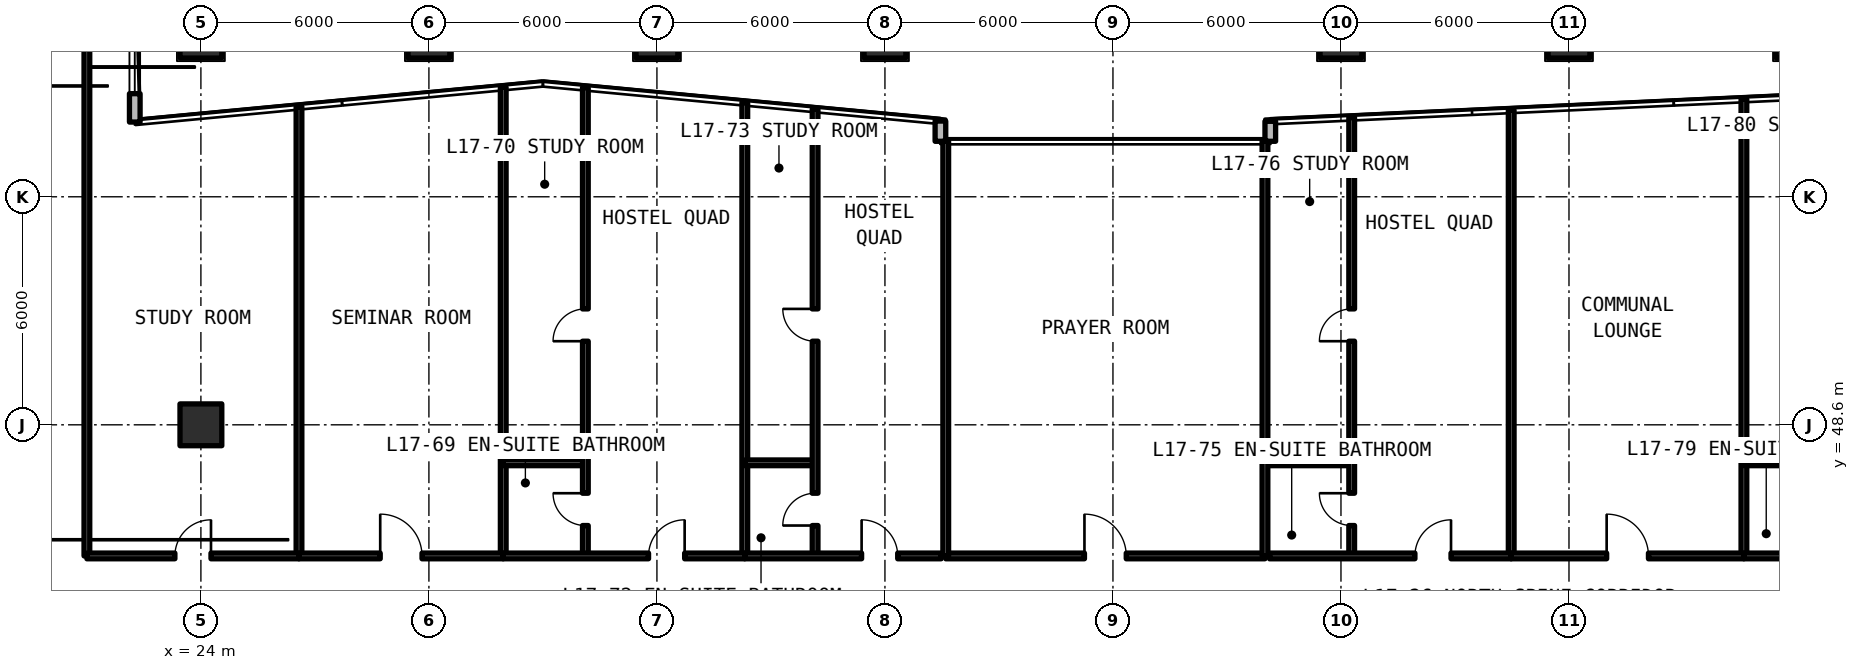
"""IFC4 building model, lengths in metres.
Left out: names, types, materials, properties, quantities, classifications, styles, units other than length and angle.
Written with IfcOpenShell. Run it as: python <this file> out.ifc"""

import sys

from ifc_helpers import new_model, si_unit, direction, frame, frame_2d, origin, origin_2d, place, context, subcontext, project, spatial, rectangle, extrude, element, fill, save


model = new_model("IFC4")
c1 = context("Model", 3, precision=1e-05, world=origin(), true_north=direction((0.0, 1.0)))
c2 = subcontext(c1, "Body", "Model", "MODEL_VIEW")
j1 = project(units=[si_unit("LENGTHUNIT", "METRE"), si_unit("PLANEANGLEUNIT", "RADIAN")], contexts=[c1])
p1 = place(None, origin())
s1 = spatial("IfcSite", under=j1, at=p1, CompositionType="ELEMENT")
p2 = place(p1, origin())
s2 = spatial("IfcBuilding", under=s1, at=p2, CompositionType="ELEMENT")
p3 = place(p2, frame((0.0, 0.0, 62.37)))
s3 = spatial("IfcBuildingStorey", under=s2, at=p3, CompositionType="ELEMENT", Elevation=62.37)
for number, where, z_axis, x_axis in (
    (1, (24.0, 48.6, 0.0), (0.0, 0.0, 1.0), (1.0, 0.0, 0.0)),
    (2, (24.0, 58.8, 0.0), (0.0, 0.0, 1.0), (1.0, 0.0, 0.0)),
    (3, (30.0, 58.8, 0.0), (0.0, 0.0, 1.0), (1.0, 0.0, 0.0)),
    (4, (36.0, 58.8, 0.0), (0.0, 0.0, 1.0), (1.0, 0.0, 0.0)),
    (5, (42.0, 58.8, 0.0), (0.0, 0.0, 1.0), (1.0, 0.0, 0.0)),
    (6, (54.0, 58.8, 0.0), (0.0, 0.0, 1.0), (1.0, 0.0, 0.0)),
    (7, (60.0, 58.8, 0.0), (0.0, 0.0, 1.0), (1.0, 0.0, 0.0)),
    (8, (66.0, 58.8, 0.0), (0.0, 0.0, 1.0), (1.0, 0.0, 0.0)),
):
    element("IfcColumn", number, at=place(p3, frame(where, z_axis=z_axis, x_axis=x_axis)), inside=s3, PredefinedType="COLUMN", context=c2, shape_type="SweptSolid", body=[
        extrude(rectangle(XDim=1.1, YDim=1.1, at=origin_2d()), origin(), (0.0, 0.0, 1.0), 3.63),
    ])
p4 = place(p3, frame((52.14, 56.586, 0.0), z_axis=(0.0, 0.0, 1.0), x_axis=(0.0, -1.0, 0.0)))
e9 = element("IfcWall", 9, at=p4, inside=s3, PredefinedType="SOLIDWALL", context=c2, shape_type="SweptSolid", body=[
    extrude(rectangle(XDim=0.526, YDim=0.28, at=frame_2d((0.263, 0.0))), origin(), (0.0, 0.0, 1.0), 3.41),
])
p5 = place(p3, frame((43.46, 56.06, 0.0), z_axis=(0.0, 0.0, 1.0), x_axis=(0.0, 1.0, 0.0)))
e10 = element("IfcWall", 10, at=p5, inside=s3, PredefinedType="SOLIDWALL", context=c2, shape_type="SweptSolid", body=[
    extrude(rectangle(XDim=0.532, YDim=0.28, at=frame_2d((0.266, 0.0))), origin(), (0.0, 0.0, 1.0), 3.41),
])
p6 = place(p3, frame((22.26, 56.566, 0.0), z_axis=(0.0, 0.0, 1.0), x_axis=(0.0, 1.0, 0.0)))
e11 = element("IfcWall", 11, at=p6, inside=s3, PredefinedType="SOLIDWALL", context=c2, shape_type="SweptSolid", body=[
    extrude(rectangle(XDim=2.894, YDim=0.28, at=frame_2d((1.447, 0.0))), origin(), (0.0, 0.0, 1.0), 3.41),
])
p7 = place(p6, frame((0.747, 0.0, 0.78)))
e12 = element("IfcOpeningElement", 12, at=p7, cuts=e11, PredefinedType="OPENING", context=c2, shape_type="SweptSolid", body=[
    extrude(rectangle(XDim=1.4, YDim=1.65, at=frame_2d((0.7, 0.825))), frame((0.0, 0.15, 0.0), z_axis=(0.0, -1.0, 0.0), x_axis=(1.0, 0.0, 0.0)), (0.0, 0.0, 1.0), 0.3),
])
p8 = place(p3, frame((20.858, 59.46, 0.0), z_axis=(0.0, 0.0, 1.0), x_axis=(-0.707106781187, -0.707106781187, 0.0)))
e13 = element("IfcWall", 13, at=p8, inside=s3, PredefinedType="SOLIDWALL", context=c2, shape_type="SweptSolid", body=[
    extrude(rectangle(XDim=5.824, YDim=0.28, at=frame_2d((2.912, 0.0))), origin(), (0.0, 0.0, 1.0), 3.41),
])
p9 = place(p8, frame((1.212, 0.0, 0.78)))
e14 = element("IfcOpeningElement", 14, at=p9, cuts=e13, PredefinedType="OPENING", context=c2, shape_type="SweptSolid", body=[
    extrude(rectangle(XDim=3.4, YDim=1.66, at=frame_2d((1.7, 0.83))), frame((0.0, 0.15, 0.0), z_axis=(0.0, -1.0, 0.0), x_axis=(1.0, 0.0, 0.0)), (0.0, 0.0, 1.0), 0.3),
])
p10 = place(p3, frame((43.6, 45.15, 0.0), z_axis=(0.0, 0.0, 1.0), x_axis=(1.0, 0.0, 0.0)))
e15 = element("IfcWall", 15, at=p10, inside=s3, PredefinedType="SOLIDWALL", context=c2, shape_type="SweptSolid", body=[
    extrude(rectangle(XDim=8.4, YDim=0.15, at=frame_2d((4.2, 0.0))), origin(), (0.0, 0.0, 1.0), 2.63),
])
p11 = place(p10, frame((3.65, 0.0, 0.0)))
e16 = element("IfcOpeningElement", 16, at=p11, cuts=e15, PredefinedType="OPENING", context=c2, shape_type="SweptSolid", body=[
    extrude(rectangle(XDim=1.1, YDim=2.15, at=frame_2d((0.55, 1.075))), frame((0.0, 0.085, 0.0), z_axis=(0.0, -1.0, 0.0), x_axis=(1.0, 0.0, 0.0)), (0.0, 0.0, 1.0), 0.17),
])
for number, where, z_axis, x_axis in (
    (17, (43.6, 45.15, 0.0), (0.0, 0.0, 1.0), (0.0, 1.0, 0.0)),
    (18, (52.0, 45.15, 0.0), (0.0, 0.0, 1.0), (0.0, 1.0, 0.0)),
):
    element("IfcWall", number, at=place(p3, frame(where, z_axis=z_axis, x_axis=x_axis)), inside=s3, PredefinedType="SOLIDWALL", context=c2, shape_type="SweptSolid", body=[
        extrude(rectangle(XDim=10.91, YDim=0.15, at=frame_2d((5.455, 0.0))), origin(), (0.0, 0.0, 1.0), 2.63),
    ])
p12 = place(p3, frame((21.0, 45.15, 0.0), z_axis=(0.0, 0.0, 1.0), x_axis=(0.0, 1.0, 0.0)))
e19 = element("IfcWall", 19, at=p12, inside=s3, PredefinedType="SOLIDWALL", context=c2, shape_type="SweptSolid", body=[
    extrude(rectangle(XDim=14.31, YDim=0.15, at=frame_2d((7.155, 0.0))), origin(), (0.0, 0.0, 1.0), 2.63),
])
p13 = place(p3, frame((26.581, 45.15, 0.0), z_axis=(0.0, 0.0, 1.0), x_axis=(0.0, 1.0, 0.0)))
e20 = element("IfcWall", 20, at=p13, inside=s3, PredefinedType="SOLIDWALL", context=c2, shape_type="SweptSolid", body=[
    extrude(rectangle(XDim=11.824, YDim=0.15, at=frame_2d((5.912, 0.0))), origin(), (0.0, 0.0, 1.0), 2.63),
])
p14 = place(p3, frame((21.0, 45.15, 0.0), z_axis=(0.0, 0.0, 1.0), x_axis=(1.0, 0.0, 0.0)))
e21 = element("IfcWall", 21, at=p14, inside=s3, PredefinedType="SOLIDWALL", context=c2, shape_type="SweptSolid", body=[
    extrude(rectangle(XDim=5.581, YDim=0.15, at=frame_2d((2.791, 0.0))), origin(), (0.0, 0.0, 1.0), 2.63),
])
p15 = place(p14, frame((2.316, 0.0, 0.0)))
e22 = element("IfcOpeningElement", 22, at=p15, cuts=e21, PredefinedType="OPENING", context=c2, shape_type="SweptSolid", body=[
    extrude(rectangle(XDim=0.95, YDim=2.15, at=frame_2d((0.475, 1.075))), frame((0.0, 0.085, 0.0), z_axis=(0.0, -1.0, 0.0), x_axis=(1.0, 0.0, 0.0)), (0.0, 0.0, 1.0), 0.17),
])
p16 = place(p3, frame((31.956, 45.15, 0.0), z_axis=(0.0, 0.0, 1.0), x_axis=(0.0, 1.0, 0.0)))
e23 = element("IfcWall", 23, at=p16, inside=s3, PredefinedType="SOLIDWALL", context=c2, shape_type="SweptSolid", body=[
    extrude(rectangle(XDim=12.331, YDim=0.15, at=frame_2d((6.166, 0.0))), origin(), (0.0, 0.0, 1.0), 2.63),
])
p17 = place(p3, frame((26.581, 45.15, 0.0), z_axis=(0.0, 0.0, 1.0), x_axis=(1.0, 0.0, 0.0)))
e24 = element("IfcWall", 24, at=p17, inside=s3, PredefinedType="SOLIDWALL", context=c2, shape_type="SweptSolid", body=[
    extrude(rectangle(XDim=5.375, YDim=0.15, at=frame_2d((2.687, 0.0))), origin(), (0.0, 0.0, 1.0), 2.63),
])
p18 = place(p17, frame((2.137, 0.0, 0.0)))
e25 = element("IfcOpeningElement", 25, at=p18, cuts=e24, PredefinedType="OPENING", context=c2, shape_type="SweptSolid", body=[
    extrude(rectangle(XDim=1.1, YDim=2.15, at=frame_2d((0.55, 1.075))), frame((0.0, 0.085, 0.0), z_axis=(0.0, -1.0, 0.0), x_axis=(1.0, 0.0, 0.0)), (0.0, 0.0, 1.0), 0.17),
])
p19 = place(p3, frame((38.312, 45.15, 0.0), z_axis=(0.0, 0.0, 1.0), x_axis=(0.0, 1.0, 0.0)))
e26 = element("IfcWall", 26, at=p19, inside=s3, PredefinedType="SOLIDWALL", context=c2, shape_type="SweptSolid", body=[
    extrude(rectangle(XDim=11.928, YDim=0.15, at=frame_2d((5.964, 0.0))), origin(), (0.0, 0.0, 1.0), 2.63),
])
p20 = place(p3, frame((31.956, 47.6, 0.0), z_axis=(0.0, 0.0, 1.0), x_axis=(1.0, 0.0, 0.0)))
e27 = element("IfcWall", 27, at=p20, inside=s3, PredefinedType="PARTITIONING", context=c2, shape_type="SweptSolid", body=[
    extrude(rectangle(XDim=2.161, YDim=0.15, at=frame_2d((1.081, 0.0))), origin(), (0.0, 0.0, 1.0), 2.63),
])
p21 = place(p3, frame((34.117, 45.15, 0.0), z_axis=(0.0, 0.0, 1.0), x_axis=(0.0, 1.0, 0.0)))
e28 = element("IfcWall", 28, at=p21, inside=s3, PredefinedType="PARTITIONING", context=c2, shape_type="SweptSolid", body=[
    extrude(rectangle(XDim=12.324, YDim=0.15, at=frame_2d((6.162, 0.0))), origin(), (0.0, 0.0, 1.0), 2.63),
])
p22 = place(p21, frame((0.8, 0.0, 0.0)))
e29 = element("IfcOpeningElement", 29, at=p22, cuts=e28, PredefinedType="OPENING", context=c2, shape_type="SweptSolid", body=[
    extrude(rectangle(XDim=0.85, YDim=2.1, at=frame_2d((0.425, 1.05))), frame((0.0, 0.085, 0.0), z_axis=(0.0, -1.0, 0.0), x_axis=(1.0, 0.0, 0.0)), (0.0, 0.0, 1.0), 0.17),
])
p23 = place(p21, frame((5.65, 0.0, 0.0)))
e30 = element("IfcOpeningElement", 30, at=p23, cuts=e28, PredefinedType="OPENING", context=c2, shape_type="SweptSolid", body=[
    extrude(rectangle(XDim=0.85, YDim=2.1, at=frame_2d((0.425, 1.05))), frame((0.0, 0.085, 0.0), z_axis=(0.0, -1.0, 0.0), x_axis=(1.0, 0.0, 0.0)), (0.0, 0.0, 1.0), 0.17),
])
p24 = place(p3, frame((31.956, 45.15, 0.0), z_axis=(0.0, 0.0, 1.0), x_axis=(1.0, 0.0, 0.0)))
e31 = element("IfcWall", 31, at=p24, inside=s3, PredefinedType="SOLIDWALL", context=c2, shape_type="SweptSolid", body=[
    extrude(rectangle(XDim=6.356, YDim=0.15, at=frame_2d((3.178, 0.0))), origin(), (0.0, 0.0, 1.0), 2.63),
])
p25 = place(p24, frame((3.824, 0.0, 0.0)))
e32 = element("IfcOpeningElement", 32, at=p25, cuts=e31, PredefinedType="OPENING", context=c2, shape_type="SweptSolid", body=[
    extrude(rectangle(XDim=0.95, YDim=2.15, at=frame_2d((0.475, 1.075))), frame((0.0, 0.085, 0.0), z_axis=(0.0, -1.0, 0.0), x_axis=(1.0, 0.0, 0.0)), (0.0, 0.0, 1.0), 0.17),
])
p26 = place(p3, frame((38.312, 47.6, 0.0), z_axis=(0.0, 0.0, 1.0), x_axis=(1.0, 0.0, 0.0)))
e33 = element("IfcWall", 33, at=p26, inside=s3, PredefinedType="PARTITIONING", context=c2, shape_type="SweptSolid", body=[
    extrude(rectangle(XDim=1.85, YDim=0.15, at=frame_2d((0.925, 0.0))), origin(), (0.0, 0.0, 1.0), 2.63),
])
p27 = place(p3, frame((40.162, 45.15, 0.0), z_axis=(0.0, 0.0, 1.0), x_axis=(0.0, 1.0, 0.0)))
e34 = element("IfcWall", 34, at=p27, inside=s3, PredefinedType="PARTITIONING", context=c2, shape_type="SweptSolid", body=[
    extrude(rectangle(XDim=11.754, YDim=0.15, at=frame_2d((5.877, 0.0))), origin(), (0.0, 0.0, 1.0), 2.63),
])
p28 = place(p27, frame((0.8, 0.0, 0.0)))
e35 = element("IfcOpeningElement", 35, at=p28, cuts=e34, PredefinedType="OPENING", context=c2, shape_type="SweptSolid", body=[
    extrude(rectangle(XDim=0.85, YDim=2.1, at=frame_2d((0.425, 1.05))), frame((0.0, 0.085, 0.0), z_axis=(0.0, -1.0, 0.0), x_axis=(1.0, 0.0, 0.0)), (0.0, 0.0, 1.0), 0.17),
])
p29 = place(p27, frame((5.65, 0.0, 0.0)))
e36 = element("IfcOpeningElement", 36, at=p29, cuts=e34, PredefinedType="OPENING", context=c2, shape_type="SweptSolid", body=[
    extrude(rectangle(XDim=0.85, YDim=2.1, at=frame_2d((0.425, 1.05))), frame((0.0, 0.085, 0.0), z_axis=(0.0, -1.0, 0.0), x_axis=(1.0, 0.0, 0.0)), (0.0, 0.0, 1.0), 0.17),
])
p30 = place(p3, frame((38.312, 45.15, 0.0), z_axis=(0.0, 0.0, 1.0), x_axis=(1.0, 0.0, 0.0)))
e37 = element("IfcWall", 37, at=p30, inside=s3, PredefinedType="SOLIDWALL", context=c2, shape_type="SweptSolid", body=[
    extrude(rectangle(XDim=5.168, YDim=0.15, at=frame_2d((2.584, 0.0))), origin(), (0.0, 0.0, 1.0), 2.63),
])
p31 = place(p30, frame((3.074, 0.0, 0.0)))
e38 = element("IfcOpeningElement", 38, at=p31, cuts=e37, PredefinedType="OPENING", context=c2, shape_type="SweptSolid", body=[
    extrude(rectangle(XDim=0.95, YDim=2.15, at=frame_2d((0.475, 1.075))), frame((0.0, 0.085, 0.0), z_axis=(0.0, -1.0, 0.0), x_axis=(1.0, 0.0, 0.0)), (0.0, 0.0, 1.0), 0.17),
])
p32 = place(p3, frame((58.479, 45.15, 0.0), z_axis=(0.0, 0.0, 1.0), x_axis=(0.0, 1.0, 0.0)))
e39 = element("IfcWall", 39, at=p32, inside=s3, PredefinedType="SOLIDWALL", context=c2, shape_type="SweptSolid", body=[
    extrude(rectangle(XDim=11.731, YDim=0.15, at=frame_2d((5.866, 0.0))), origin(), (0.0, 0.0, 1.0), 2.63),
])
p33 = place(p3, frame((52.12, 47.6, 0.0), z_axis=(0.0, 0.0, 1.0), x_axis=(1.0, 0.0, 0.0)))
e40 = element("IfcWall", 40, at=p33, inside=s3, PredefinedType="PARTITIONING", context=c2, shape_type="SweptSolid", body=[
    extrude(rectangle(XDim=2.162, YDim=0.15, at=frame_2d((1.081, 0.0))), origin(), (0.0, 0.0, 1.0), 2.63),
])
p34 = place(p3, frame((54.282, 45.15, 0.0), z_axis=(0.0, 0.0, 1.0), x_axis=(0.0, 1.0, 0.0)))
e41 = element("IfcWall", 41, at=p34, inside=s3, PredefinedType="PARTITIONING", context=c2, shape_type="SweptSolid", body=[
    extrude(rectangle(XDim=11.536, YDim=0.15, at=frame_2d((5.768, 0.0))), origin(), (0.0, 0.0, 1.0), 2.63),
])
p35 = place(p34, frame((0.8, 0.0, 0.0)))
e42 = element("IfcOpeningElement", 42, at=p35, cuts=e41, PredefinedType="OPENING", context=c2, shape_type="SweptSolid", body=[
    extrude(rectangle(XDim=0.85, YDim=2.1, at=frame_2d((0.425, 1.05))), frame((0.0, 0.085, 0.0), z_axis=(0.0, -1.0, 0.0), x_axis=(1.0, 0.0, 0.0)), (0.0, 0.0, 1.0), 0.17),
])
p36 = place(p34, frame((5.65, 0.0, 0.0)))
e43 = element("IfcOpeningElement", 43, at=p36, cuts=e41, PredefinedType="OPENING", context=c2, shape_type="SweptSolid", body=[
    extrude(rectangle(XDim=0.85, YDim=2.1, at=frame_2d((0.425, 1.05))), frame((0.0, 0.085, 0.0), z_axis=(0.0, -1.0, 0.0), x_axis=(1.0, 0.0, 0.0)), (0.0, 0.0, 1.0), 0.17),
])
p37 = place(p3, frame((52.12, 45.15, 0.0), z_axis=(0.0, 0.0, 1.0), x_axis=(1.0, 0.0, 0.0)))
e44 = element("IfcWall", 44, at=p37, inside=s3, PredefinedType="SOLIDWALL", context=c2, shape_type="SweptSolid", body=[
    extrude(rectangle(XDim=6.359, YDim=0.15, at=frame_2d((3.18, 0.0))), origin(), (0.0, 0.0, 1.0), 2.63),
])
p38 = place(p37, frame((3.826, 0.0, 0.0)))
e45 = element("IfcOpeningElement", 45, at=p38, cuts=e44, PredefinedType="OPENING", context=c2, shape_type="SweptSolid", body=[
    extrude(rectangle(XDim=0.95, YDim=2.15, at=frame_2d((0.475, 1.075))), frame((0.0, 0.085, 0.0), z_axis=(0.0, -1.0, 0.0), x_axis=(1.0, 0.0, 0.0)), (0.0, 0.0, 1.0), 0.17),
])
p39 = place(p3, frame((64.603, 45.15, 0.0), z_axis=(0.0, 0.0, 1.0), x_axis=(0.0, 1.0, 0.0)))
e46 = element("IfcWall", 46, at=p39, inside=s3, PredefinedType="SOLIDWALL", context=c2, shape_type="SweptSolid", body=[
    extrude(rectangle(XDim=12.016, YDim=0.15, at=frame_2d((6.008, 0.0))), origin(), (0.0, 0.0, 1.0), 2.63),
])
p40 = place(p3, frame((58.479, 45.15, 0.0), z_axis=(0.0, 0.0, 1.0), x_axis=(1.0, 0.0, 0.0)))
e47 = element("IfcWall", 47, at=p40, inside=s3, PredefinedType="SOLIDWALL", context=c2, shape_type="SweptSolid", body=[
    extrude(rectangle(XDim=6.124, YDim=0.15, at=frame_2d((3.062, 0.0))), origin(), (0.0, 0.0, 1.0), 2.63),
])
p41 = place(p40, frame((2.512, 0.0, 0.0)))
e48 = element("IfcOpeningElement", 48, at=p41, cuts=e47, PredefinedType="OPENING", context=c2, shape_type="SweptSolid", body=[
    extrude(rectangle(XDim=1.1, YDim=2.15, at=frame_2d((0.55, 1.075))), frame((0.0, 0.085, 0.0), z_axis=(0.0, -1.0, 0.0), x_axis=(1.0, 0.0, 0.0)), (0.0, 0.0, 1.0), 0.17),
])
p42 = place(p3, frame((64.603, 47.6, 0.0), z_axis=(0.0, 0.0, 1.0), x_axis=(1.0, 0.0, 0.0)))
e49 = element("IfcWall", 49, at=p42, inside=s3, PredefinedType="PARTITIONING", context=c2, shape_type="SweptSolid", body=[
    extrude(rectangle(XDim=2.242, YDim=0.15, at=frame_2d((1.121, 0.0))), origin(), (0.0, 0.0, 1.0), 2.63),
])
p43 = place(p3, frame((64.603, 45.15, 0.0), z_axis=(0.0, 0.0, 1.0), x_axis=(1.0, 0.0, 0.0)))
e50 = element("IfcWall", 50, at=p43, inside=s3, PredefinedType="SOLIDWALL", context=c2, shape_type="SweptSolid", body=[
    extrude(rectangle(XDim=6.595, YDim=0.15, at=frame_2d((3.297, 0.0))), origin(), (0.0, 0.0, 1.0), 2.63),
])
p44 = place(p43, frame((3.984, 0.0, 0.0)))
e51 = element("IfcOpeningElement", 51, at=p44, cuts=e50, PredefinedType="OPENING", context=c2, shape_type="SweptSolid", body=[
    extrude(rectangle(XDim=0.95, YDim=2.15, at=frame_2d((0.475, 1.075))), frame((0.0, 0.085, 0.0), z_axis=(0.0, -1.0, 0.0), x_axis=(1.0, 0.0, 0.0)), (0.0, 0.0, 1.0), 0.17),
])
p45 = place(p7, origin())
e52 = element("IfcWindow", 52, at=p45, inside=s3, PartitioningType="SINGLE_PANEL", PredefinedType="WINDOW", context=c2, shape_type="SweptSolid", body=[
    extrude(rectangle(XDim=1.4, YDim=1.65, at=frame_2d((0.7, 0.825))), frame((0.0, 0.03, 0.0), z_axis=(0.0, -1.0, 0.0), x_axis=(1.0, 0.0, 0.0)), (0.0, 0.0, 1.0), 0.06),
])
fill(e12, e52)
p46 = place(p11, origin())
e53 = element("IfcDoor", 53, at=p46, inside=s3, OperationType="SINGLE_SWING_LEFT", PredefinedType="DOOR", context=c2, shape_type="SweptSolid", body=[
    extrude(rectangle(XDim=1.1, YDim=2.15, at=frame_2d((0.55, 1.075))), frame((0.0, 0.025, 0.0), z_axis=(0.0, -1.0, 0.0), x_axis=(1.0, 0.0, 0.0)), (0.0, 0.0, 1.0), 0.05),
])
fill(e16, e53)
p47 = place(p15, origin())
e54 = element("IfcDoor", 54, at=p47, inside=s3, OperationType="SINGLE_SWING_RIGHT", PredefinedType="DOOR", context=c2, shape_type="SweptSolid", body=[
    extrude(rectangle(XDim=0.95, YDim=2.15, at=frame_2d((0.475, 1.075))), frame((0.0, 0.025, 0.0), z_axis=(0.0, -1.0, 0.0), x_axis=(1.0, 0.0, 0.0)), (0.0, 0.0, 1.0), 0.05),
])
fill(e22, e54)
p48 = place(p18, origin())
e55 = element("IfcDoor", 55, at=p48, inside=s3, OperationType="SINGLE_SWING_LEFT", PredefinedType="DOOR", context=c2, shape_type="SweptSolid", body=[
    extrude(rectangle(XDim=1.1, YDim=2.15, at=frame_2d((0.55, 1.075))), frame((0.0, 0.025, 0.0), z_axis=(0.0, -1.0, 0.0), x_axis=(1.0, 0.0, 0.0)), (0.0, 0.0, 1.0), 0.05),
])
fill(e25, e55)
p49 = place(p22, origin())
e56 = element("IfcDoor", 56, at=p49, inside=s3, OperationType="SINGLE_SWING_RIGHT", PredefinedType="DOOR", context=c2, shape_type="SweptSolid", body=[
    extrude(rectangle(XDim=0.85, YDim=2.1, at=frame_2d((0.425, 1.05))), frame((0.0, 0.025, 0.0), z_axis=(0.0, -1.0, 0.0), x_axis=(1.0, 0.0, 0.0)), (0.0, 0.0, 1.0), 0.05),
])
fill(e29, e56)
p50 = place(p23, origin())
e57 = element("IfcDoor", 57, at=p50, inside=s3, OperationType="SINGLE_SWING_LEFT", PredefinedType="DOOR", context=c2, shape_type="SweptSolid", body=[
    extrude(rectangle(XDim=0.85, YDim=2.1, at=frame_2d((0.425, 1.05))), frame((0.0, 0.025, 0.0), z_axis=(0.0, -1.0, 0.0), x_axis=(1.0, 0.0, 0.0)), (0.0, 0.0, 1.0), 0.05),
])
fill(e30, e57)
p51 = place(p25, origin())
e58 = element("IfcDoor", 58, at=p51, inside=s3, OperationType="SINGLE_SWING_RIGHT", PredefinedType="DOOR", context=c2, shape_type="SweptSolid", body=[
    extrude(rectangle(XDim=0.95, YDim=2.15, at=frame_2d((0.475, 1.075))), frame((0.0, 0.025, 0.0), z_axis=(0.0, -1.0, 0.0), x_axis=(1.0, 0.0, 0.0)), (0.0, 0.0, 1.0), 0.05),
])
fill(e32, e58)
p52 = place(p28, origin())
e59 = element("IfcDoor", 59, at=p52, inside=s3, OperationType="SINGLE_SWING_LEFT", PredefinedType="DOOR", context=c2, shape_type="SweptSolid", body=[
    extrude(rectangle(XDim=0.85, YDim=2.1, at=frame_2d((0.425, 1.05))), frame((0.0, 0.025, 0.0), z_axis=(0.0, -1.0, 0.0), x_axis=(1.0, 0.0, 0.0)), (0.0, 0.0, 1.0), 0.05),
])
fill(e35, e59)
p53 = place(p29, origin())
e60 = element("IfcDoor", 60, at=p53, inside=s3, OperationType="SINGLE_SWING_RIGHT", PredefinedType="DOOR", context=c2, shape_type="SweptSolid", body=[
    extrude(rectangle(XDim=0.85, YDim=2.1, at=frame_2d((0.425, 1.05))), frame((0.0, 0.025, 0.0), z_axis=(0.0, -1.0, 0.0), x_axis=(1.0, 0.0, 0.0)), (0.0, 0.0, 1.0), 0.05),
])
fill(e36, e60)
p54 = place(p31, origin())
e61 = element("IfcDoor", 61, at=p54, inside=s3, OperationType="SINGLE_SWING_LEFT", PredefinedType="DOOR", context=c2, shape_type="SweptSolid", body=[
    extrude(rectangle(XDim=0.95, YDim=2.15, at=frame_2d((0.475, 1.075))), frame((0.0, 0.025, 0.0), z_axis=(0.0, -1.0, 0.0), x_axis=(1.0, 0.0, 0.0)), (0.0, 0.0, 1.0), 0.05),
])
fill(e38, e61)
p55 = place(p35, origin())
e62 = element("IfcDoor", 62, at=p55, inside=s3, OperationType="SINGLE_SWING_RIGHT", PredefinedType="DOOR", context=c2, shape_type="SweptSolid", body=[
    extrude(rectangle(XDim=0.85, YDim=2.1, at=frame_2d((0.425, 1.05))), frame((0.0, 0.025, 0.0), z_axis=(0.0, -1.0, 0.0), x_axis=(1.0, 0.0, 0.0)), (0.0, 0.0, 1.0), 0.05),
])
fill(e42, e62)
p56 = place(p36, origin())
e63 = element("IfcDoor", 63, at=p56, inside=s3, OperationType="SINGLE_SWING_LEFT", PredefinedType="DOOR", context=c2, shape_type="SweptSolid", body=[
    extrude(rectangle(XDim=0.85, YDim=2.1, at=frame_2d((0.425, 1.05))), frame((0.0, 0.025, 0.0), z_axis=(0.0, -1.0, 0.0), x_axis=(1.0, 0.0, 0.0)), (0.0, 0.0, 1.0), 0.05),
])
fill(e43, e63)
p57 = place(p38, origin())
e64 = element("IfcDoor", 64, at=p57, inside=s3, OperationType="SINGLE_SWING_RIGHT", PredefinedType="DOOR", context=c2, shape_type="SweptSolid", body=[
    extrude(rectangle(XDim=0.95, YDim=2.15, at=frame_2d((0.475, 1.075))), frame((0.0, 0.025, 0.0), z_axis=(0.0, -1.0, 0.0), x_axis=(1.0, 0.0, 0.0)), (0.0, 0.0, 1.0), 0.05),
])
fill(e45, e64)
p58 = place(p41, origin())
e65 = element("IfcDoor", 65, at=p58, inside=s3, OperationType="SINGLE_SWING_LEFT", PredefinedType="DOOR", context=c2, shape_type="SweptSolid", body=[
    extrude(rectangle(XDim=1.1, YDim=2.15, at=frame_2d((0.55, 1.075))), frame((0.0, 0.025, 0.0), z_axis=(0.0, -1.0, 0.0), x_axis=(1.0, 0.0, 0.0)), (0.0, 0.0, 1.0), 0.05),
])
fill(e48, e65)
save(model, sys.argv[1])
